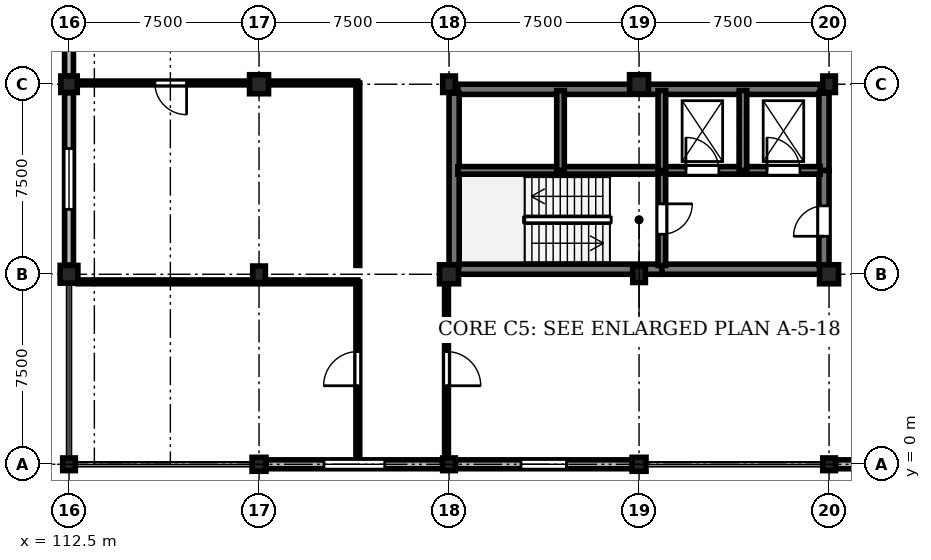
"""IFC4 building model, lengths in metres.
Left out: names, types, materials, properties, quantities, classifications, styles, units other than length and angle.
Written with IfcOpenShell. Run it as: python <this file> out.ifc"""

import sys

from ifc_helpers import new_model, si_unit, direction, frame, frame_2d, origin, origin_2d, place, context, subcontext, project, spatial, rectangle, extrude, element, fill, save


model = new_model("IFC4")
c1 = context("Model", 3, precision=1e-05, world=origin(), true_north=direction((0.0, 1.0)))
c2 = subcontext(c1, "Body", "Model", "MODEL_VIEW")
j1 = project(units=[si_unit("LENGTHUNIT", "METRE"), si_unit("PLANEANGLEUNIT", "RADIAN")], contexts=[c1])
p1 = place(None, origin())
s1 = spatial("IfcSite", under=j1, at=p1, CompositionType="ELEMENT")
p2 = place(p1, origin())
s2 = spatial("IfcBuilding", under=s1, at=p2, CompositionType="ELEMENT")
p3 = place(p2, frame((0.0, 0.0, 4.8)))
s3 = spatial("IfcBuildingStorey", under=s2, at=p3, CompositionType="ELEMENT", Elevation=4.8)
p4 = place(p3, frame((112.5, 0.0, 0.0), z_axis=(0.0, 0.0, 1.0), x_axis=(1.0, 0.0, 0.0)))
e1 = element("IfcColumn", 1, at=p4, inside=s3, PredefinedType="COLUMN", context=c2, shape_type="SweptSolid", body=[
    extrude(rectangle(XDim=0.5, YDim=0.5, at=origin_2d()), origin(), (0.0, 0.0, 1.0), 4.5),
])
p5 = place(p3, frame((112.5, 7.5, 0.0), z_axis=(0.0, 0.0, 1.0), x_axis=(1.0, 0.0, 0.0)))
e2 = element("IfcColumn", 2, at=p5, inside=s3, PredefinedType="COLUMN", context=c2, shape_type="SweptSolid", body=[
    extrude(rectangle(XDim=0.7, YDim=0.7, at=origin_2d()), origin(), (0.0, 0.0, 1.0), 4.5),
])
p6 = place(p3, frame((112.5, 15.0, 0.0), z_axis=(0.0, 0.0, 1.0), x_axis=(1.0, 0.0, 0.0)))
e3 = element("IfcColumn", 3, at=p6, inside=s3, PredefinedType="COLUMN", context=c2, shape_type="SweptSolid", body=[
    extrude(rectangle(XDim=0.65, YDim=0.65, at=origin_2d()), origin(), (0.0, 0.0, 1.0), 4.5),
])
p7 = place(p3, frame((120.0, 0.0, 0.0), z_axis=(0.0, 0.0, 1.0), x_axis=(1.0, 0.0, 0.0)))
e4 = element("IfcColumn", 4, at=p7, inside=s3, PredefinedType="COLUMN", context=c2, shape_type="SweptSolid", body=[
    extrude(rectangle(XDim=0.55, YDim=0.55, at=origin_2d()), origin(), (0.0, 0.0, 1.0), 4.5),
])
p8 = place(p3, frame((120.0, 7.5, 0.0), z_axis=(0.0, 0.0, 1.0), x_axis=(1.0, 0.0, 0.0)))
e5 = element("IfcColumn", 5, at=p8, inside=s3, PredefinedType="COLUMN", context=c2, shape_type="SweptSolid", body=[
    extrude(rectangle(XDim=0.5, YDim=0.65, at=origin_2d()), origin(), (0.0, 0.0, 1.0), 4.5),
])
p9 = place(p3, frame((120.0, 15.0, 0.0), z_axis=(0.0, 0.0, 1.0), x_axis=(1.0, 0.0, 0.0)))
e6 = element("IfcColumn", 6, at=p9, inside=s3, PredefinedType="COLUMN", context=c2, shape_type="SweptSolid", body=[
    extrude(rectangle(XDim=0.75, YDim=0.75, at=origin_2d()), origin(), (0.0, 0.0, 1.0), 4.5),
])
p10 = place(p3, frame((127.5, 0.0, 0.0), z_axis=(0.0, 0.0, 1.0), x_axis=(1.0, 0.0, 0.0)))
e7 = element("IfcColumn", 7, at=p10, inside=s3, PredefinedType="COLUMN", context=c2, shape_type="SweptSolid", body=[
    extrude(rectangle(XDim=0.5, YDim=0.5, at=origin_2d()), origin(), (0.0, 0.0, 1.0), 4.5),
])
p11 = place(p3, frame((127.5, 7.5, 0.0), z_axis=(0.0, 0.0, 1.0), x_axis=(1.0, 0.0, 0.0)))
e8 = element("IfcColumn", 8, at=p11, inside=s3, PredefinedType="COLUMN", context=c2, shape_type="SweptSolid", body=[
    extrude(rectangle(XDim=0.75, YDim=0.75, at=origin_2d()), origin(), (0.0, 0.0, 1.0), 4.5),
])
p12 = place(p3, frame((127.5, 15.0, 0.0), z_axis=(0.0, 0.0, 1.0), x_axis=(1.0, 0.0, 0.0)))
e9 = element("IfcColumn", 9, at=p12, inside=s3, PredefinedType="COLUMN", context=c2, shape_type="SweptSolid", body=[
    extrude(rectangle(XDim=0.5, YDim=0.65, at=origin_2d()), origin(), (0.0, 0.0, 1.0), 4.5),
])
p13 = place(p3, frame((135.0, 0.0, 0.0), z_axis=(0.0, 0.0, 1.0), x_axis=(1.0, 0.0, 0.0)))
e10 = element("IfcColumn", 10, at=p13, inside=s3, PredefinedType="COLUMN", context=c2, shape_type="SweptSolid", body=[
    extrude(rectangle(XDim=0.55, YDim=0.55, at=origin_2d()), origin(), (0.0, 0.0, 1.0), 4.5),
])
p14 = place(p3, frame((135.0, 7.5, 0.0), z_axis=(0.0, 0.0, 1.0), x_axis=(1.0, 0.0, 0.0)))
e11 = element("IfcColumn", 11, at=p14, inside=s3, PredefinedType="COLUMN", context=c2, shape_type="SweptSolid", body=[
    extrude(rectangle(XDim=0.5, YDim=0.65, at=origin_2d()), origin(), (0.0, 0.0, 1.0), 4.5),
])
p15 = place(p3, frame((135.0, 15.0, 0.0), z_axis=(0.0, 0.0, 1.0), x_axis=(1.0, 0.0, 0.0)))
e12 = element("IfcColumn", 12, at=p15, inside=s3, PredefinedType="COLUMN", context=c2, shape_type="SweptSolid", body=[
    extrude(rectangle(XDim=0.75, YDim=0.75, at=origin_2d()), origin(), (0.0, 0.0, 1.0), 4.5),
])
p16 = place(p3, frame((142.5, 0.0, 0.0), z_axis=(0.0, 0.0, 1.0), x_axis=(1.0, 0.0, 0.0)))
e13 = element("IfcColumn", 13, at=p16, inside=s3, PredefinedType="COLUMN", context=c2, shape_type="SweptSolid", body=[
    extrude(rectangle(XDim=0.5, YDim=0.5, at=origin_2d()), origin(), (0.0, 0.0, 1.0), 4.5),
])
p17 = place(p3, frame((142.5, 7.5, 0.0), z_axis=(0.0, 0.0, 1.0), x_axis=(1.0, 0.0, 0.0)))
e14 = element("IfcColumn", 14, at=p17, inside=s3, PredefinedType="COLUMN", context=c2, shape_type="SweptSolid", body=[
    extrude(rectangle(XDim=0.75, YDim=0.75, at=origin_2d()), origin(), (0.0, 0.0, 1.0), 4.5),
])
p18 = place(p3, frame((142.5, 15.0, 0.0), z_axis=(0.0, 0.0, 1.0), x_axis=(1.0, 0.0, 0.0)))
e15 = element("IfcColumn", 15, at=p18, inside=s3, PredefinedType="COLUMN", context=c2, shape_type="SweptSolid", body=[
    extrude(rectangle(XDim=0.5, YDim=0.65, at=origin_2d()), origin(), (0.0, 0.0, 1.0), 4.5),
])
p19 = place(p3, frame((112.5, 7.86, 0.0), z_axis=(0.0, 0.0, 1.0), x_axis=(0.0, 1.0, 0.0)))
e16 = element("IfcWall", 16, at=p19, inside=s3, PredefinedType="STANDARD", context=c2, shape_type="SweptSolid", body=[
    extrude(rectangle(XDim=6.805, YDim=0.35, at=frame_2d((3.402, 0.0))), origin(), (0.0, 0.0, 1.0), 3.63),
])
p20 = place(p19, frame((2.202, 0.0, 0.9)))
e17 = element("IfcOpeningElement", 17, at=p20, cuts=e16, PredefinedType="OPENING", context=c2, shape_type="SweptSolid", body=[
    extrude(rectangle(XDim=2.4, YDim=2.45, at=frame_2d((1.2, 1.225))), frame((0.0, 0.185, 0.0), z_axis=(0.0, -1.0, 0.0), x_axis=(1.0, 0.0, 0.0)), (0.0, 0.0, 1.0), 0.37),
])
p21 = place(p3, frame((112.5, 15.335, 0.0), z_axis=(0.0, 0.0, 1.0), x_axis=(0.0, 1.0, 0.0)))
e18 = element("IfcWall", 18, at=p21, inside=s3, PredefinedType="STANDARD", context=c2, shape_type="SweptSolid", body=[
    extrude(rectangle(XDim=6.995, YDim=0.35, at=frame_2d((3.498, 0.0))), origin(), (0.0, 0.0, 1.0), 3.63),
])
p22 = place(p21, frame((2.597, 0.0, 0.9)))
e19 = element("IfcOpeningElement", 19, at=p22, cuts=e18, PredefinedType="OPENING", context=c2, shape_type="SweptSolid", body=[
    extrude(rectangle(XDim=1.8, YDim=2.1, at=frame_2d((0.9, 1.05))), frame((0.0, 0.185, 0.0), z_axis=(0.0, -1.0, 0.0), x_axis=(1.0, 0.0, 0.0)), (0.0, 0.0, 1.0), 0.37),
])
p23 = place(p3, frame((127.24, 0.0, 0.0), z_axis=(0.0, 0.0, 1.0), x_axis=(-1.0, 0.0, 0.0)))
e20 = element("IfcWall", 20, at=p23, inside=s3, PredefinedType="STANDARD", context=c2, shape_type="SweptSolid", body=[
    extrude(rectangle(XDim=6.955, YDim=0.35, at=frame_2d((3.478, 0.0))), origin(), (0.0, 0.0, 1.0), 3.63),
])
p24 = place(p23, frame((2.278, 0.0, 0.9)))
e21 = element("IfcOpeningElement", 21, at=p24, cuts=e20, PredefinedType="OPENING", context=c2, shape_type="SweptSolid", body=[
    extrude(rectangle(XDim=2.4, YDim=2.45, at=frame_2d((1.2, 1.225))), frame((0.0, 0.185, 0.0), z_axis=(0.0, -1.0, 0.0), x_axis=(1.0, 0.0, 0.0)), (0.0, 0.0, 1.0), 0.37),
])
p25 = place(p3, frame((134.715, 0.0, 0.0), z_axis=(0.0, 0.0, 1.0), x_axis=(-1.0, 0.0, 0.0)))
e22 = element("IfcWall", 22, at=p25, inside=s3, PredefinedType="STANDARD", context=c2, shape_type="SweptSolid", body=[
    extrude(rectangle(XDim=6.955, YDim=0.35, at=frame_2d((3.478, 0.0))), origin(), (0.0, 0.0, 1.0), 3.63),
])
p26 = place(p25, frame((2.577, 0.0, 0.9)))
e23 = element("IfcOpeningElement", 23, at=p26, cuts=e22, PredefinedType="OPENING", context=c2, shape_type="SweptSolid", body=[
    extrude(rectangle(XDim=1.8, YDim=2.1, at=frame_2d((0.9, 1.05))), frame((0.0, 0.185, 0.0), z_axis=(0.0, -1.0, 0.0), x_axis=(1.0, 0.0, 0.0)), (0.0, 0.0, 1.0), 0.37),
])
p27 = place(p3, frame((149.715, 0.0, 0.0), z_axis=(0.0, 0.0, 1.0), x_axis=(-1.0, 0.0, 0.0)))
e24 = element("IfcWall", 24, at=p27, inside=s3, PredefinedType="STANDARD", context=c2, shape_type="SweptSolid", body=[
    extrude(rectangle(XDim=6.955, YDim=0.35, at=frame_2d((3.478, 0.0))), origin(), (0.0, 0.0, 1.0), 3.63),
])
p28 = place(p27, frame((2.877, 0.0, 0.9)))
e25 = element("IfcOpeningElement", 25, at=p28, cuts=e24, PredefinedType="OPENING", context=c2, shape_type="SweptSolid", body=[
    extrude(rectangle(XDim=1.2, YDim=2.1, at=frame_2d((0.6, 1.05))), frame((0.0, 0.185, 0.0), z_axis=(0.0, -1.0, 0.0), x_axis=(1.0, 0.0, 0.0)), (0.0, 0.0, 1.0), 0.37),
])
p29 = place(p3, frame((127.85, 7.7, 0.0), z_axis=(0.0, 0.0, 1.0), x_axis=(1.0, 0.0, 0.0)))
e26 = element("IfcWall", 26, at=p29, inside=s3, PredefinedType="SHEAR", context=c2, shape_type="SweptSolid", body=[
    extrude(rectangle(XDim=8.05, YDim=0.4, at=frame_2d((4.025, 0.0))), origin(), (0.0, 0.0, 1.0), 4.18),
])
p30 = place(p3, frame((135.9, 7.7, 0.0), z_axis=(0.0, 0.0, 1.0), x_axis=(1.0, 0.0, 0.0)))
e27 = element("IfcWall", 27, at=p30, inside=s3, PredefinedType="SHEAR", context=c2, shape_type="SweptSolid", body=[
    extrude(rectangle(XDim=6.25, YDim=0.4, at=frame_2d((3.125, 0.0))), origin(), (0.0, 0.0, 1.0), 4.18),
])
p31 = place(p3, frame((127.85, 14.8, 0.0), z_axis=(0.0, 0.0, 1.0), x_axis=(1.0, 0.0, 0.0)))
e28 = element("IfcWall", 28, at=p31, inside=s3, PredefinedType="SHEAR", context=c2, shape_type="SweptSolid", body=[
    extrude(rectangle(XDim=14.3, YDim=0.4, at=frame_2d((7.15, 0.0))), origin(), (0.0, 0.0, 1.0), 4.18),
])
p32 = place(p3, frame((127.7, 7.85, 0.0), z_axis=(0.0, 0.0, 1.0), x_axis=(0.0, 1.0, 0.0)))
e29 = element("IfcWall", 29, at=p32, inside=s3, PredefinedType="SHEAR", context=c2, shape_type="SweptSolid", body=[
    extrude(rectangle(XDim=6.8, YDim=0.4, at=frame_2d((3.4, 0.0))), origin(), (0.0, 0.0, 1.0), 4.18),
])
p33 = place(p3, frame((142.3, 7.85, 0.0), z_axis=(0.0, 0.0, 1.0), x_axis=(0.0, 1.0, 0.0)))
e30 = element("IfcWall", 30, at=p33, inside=s3, PredefinedType="SHEAR", context=c2, shape_type="SweptSolid", body=[
    extrude(rectangle(XDim=3.75, YDim=0.4, at=frame_2d((1.875, 0.0))), origin(), (0.0, 0.0, 1.0), 4.18),
])
p34 = place(p33, frame((1.15, 0.0, 0.0)))
e31 = element("IfcOpeningElement", 31, at=p34, cuts=e30, PredefinedType="OPENING", context=c2, shape_type="SweptSolid", body=[
    extrude(rectangle(XDim=1.2, YDim=2.25, at=frame_2d((0.6, 1.125))), frame((0.0, 0.21, 0.0), z_axis=(0.0, -1.0, 0.0), x_axis=(1.0, 0.0, 0.0)), (0.0, 0.0, 1.0), 0.42),
])
p35 = place(p3, frame((142.3, 11.6, 0.0), z_axis=(0.0, 0.0, 1.0), x_axis=(0.0, 1.0, 0.0)))
e32 = element("IfcWall", 32, at=p35, inside=s3, PredefinedType="SHEAR", context=c2, shape_type="SweptSolid", body=[
    extrude(rectangle(XDim=3.05, YDim=0.4, at=frame_2d((1.525, 0.0))), origin(), (0.0, 0.0, 1.0), 4.18),
])
p36 = place(p3, frame((127.85, 11.6, 0.0), z_axis=(0.0, 0.0, 1.0), x_axis=(1.0, 0.0, 0.0)))
e33 = element("IfcWall", 33, at=p36, inside=s3, PredefinedType="SHEAR", context=c2, shape_type="SweptSolid", body=[
    extrude(rectangle(XDim=8.05, YDim=0.3, at=frame_2d((4.025, 0.0))), origin(), (0.0, 0.0, 1.0), 4.18),
])
p37 = place(p3, frame((135.9, 11.6, 0.0), z_axis=(0.0, 0.0, 1.0), x_axis=(1.0, 0.0, 0.0)))
e34 = element("IfcWall", 34, at=p37, inside=s3, PredefinedType="SHEAR", context=c2, shape_type="SweptSolid", body=[
    extrude(rectangle(XDim=6.25, YDim=0.3, at=frame_2d((3.125, 0.0))), origin(), (0.0, 0.0, 1.0), 4.18),
])
p38 = place(p37, frame((0.95, 0.0, 0.0)))
e35 = element("IfcOpeningElement", 35, at=p38, cuts=e34, PredefinedType="OPENING", context=c2, shape_type="SweptSolid", body=[
    extrude(rectangle(XDim=1.3, YDim=2.2, at=frame_2d((0.65, 1.1))), frame((0.0, 0.16, 0.0), z_axis=(0.0, -1.0, 0.0), x_axis=(1.0, 0.0, 0.0)), (0.0, 0.0, 1.0), 0.32),
])
p39 = place(p37, frame((4.15, 0.0, 0.0)))
e36 = element("IfcOpeningElement", 36, at=p39, cuts=e34, PredefinedType="OPENING", context=c2, shape_type="SweptSolid", body=[
    extrude(rectangle(XDim=1.3, YDim=2.2, at=frame_2d((0.65, 1.1))), frame((0.0, 0.16, 0.0), z_axis=(0.0, -1.0, 0.0), x_axis=(1.0, 0.0, 0.0)), (0.0, 0.0, 1.0), 0.32),
])
p40 = place(p3, frame((135.9, 11.5, 0.0), z_axis=(0.0, 0.0, 1.0), x_axis=(0.0, -1.0, 0.0)))
e37 = element("IfcWall", 37, at=p40, inside=s3, PredefinedType="SHEAR", context=c2, shape_type="SweptSolid", body=[
    extrude(rectangle(XDim=3.65, YDim=0.3, at=frame_2d((1.825, 0.0))), origin(), (0.0, 0.0, 1.0), 4.18),
])
p41 = place(p40, frame((1.22, 0.0, 0.0)))
e38 = element("IfcOpeningElement", 38, at=p41, cuts=e37, PredefinedType="OPENING", context=c2, shape_type="SweptSolid", body=[
    extrude(rectangle(XDim=1.2, YDim=2.25, at=frame_2d((0.6, 1.125))), frame((0.0, 0.16, 0.0), z_axis=(0.0, -1.0, 0.0), x_axis=(1.0, 0.0, 0.0)), (0.0, 0.0, 1.0), 0.32),
])
for number, where, z_axis, x_axis in (
    (39, (131.9, 11.6, 0.0), (0.0, 0.0, 1.0), (0.0, 1.0, 0.0)),
    (40, (135.9, 11.6, 0.0), (0.0, 0.0, 1.0), (0.0, 1.0, 0.0)),
    (41, (139.1, 11.6, 0.0), (0.0, 0.0, 1.0), (0.0, 1.0, 0.0)),
):
    element("IfcWall", number, at=place(p3, frame(where, z_axis=z_axis, x_axis=x_axis)), inside=s3, PredefinedType="SHEAR", context=c2, shape_type="SweptSolid", body=[
        extrude(rectangle(XDim=3.15, YDim=0.3, at=frame_2d((1.575, 0.0))), origin(), (0.0, 0.0, 1.0), 4.18),
    ])
p42 = place(p3, frame((123.9, 0.35, 0.0), z_axis=(0.0, 0.0, 1.0), x_axis=(0.0, 1.0, 0.0)))
e42 = element("IfcWall", 42, at=p42, inside=s3, PredefinedType="PARTITIONING", context=c2, shape_type="SweptSolid", body=[
    extrude(rectangle(XDim=6.85, YDim=0.15, at=frame_2d((3.425, 0.0))), origin(), (0.0, 0.0, 1.0), 3.765),
])
p43 = place(p42, frame((2.75, 0.0, 0.0)))
e43 = element("IfcOpeningElement", 43, at=p43, cuts=e42, PredefinedType="OPENING", context=c2, shape_type="SweptSolid", body=[
    extrude(rectangle(XDim=1.35, YDim=2.25, at=frame_2d((0.675, 1.125))), frame((0.0, 0.085, 0.0), z_axis=(0.0, -1.0, 0.0), x_axis=(1.0, 0.0, 0.0)), (0.0, 0.0, 1.0), 0.17),
])
p44 = place(p3, frame((127.4, 7.2, 0.0), z_axis=(0.0, 0.0, 1.0), x_axis=(0.0, -1.0, 0.0)))
e44 = element("IfcWall", 44, at=p44, inside=s3, PredefinedType="PARTITIONING", context=c2, shape_type="SweptSolid", body=[
    extrude(rectangle(XDim=6.85, YDim=0.15, at=frame_2d((3.425, 0.0))), origin(), (0.0, 0.0, 1.0), 3.565),
])
p45 = place(p44, frame((2.75, 0.0, 0.0)))
e45 = element("IfcOpeningElement", 45, at=p45, cuts=e44, PredefinedType="OPENING", context=c2, shape_type="SweptSolid", body=[
    extrude(rectangle(XDim=1.35, YDim=2.25, at=frame_2d((0.675, 1.125))), frame((0.0, 0.085, 0.0), z_axis=(0.0, -1.0, 0.0), x_axis=(1.0, 0.0, 0.0)), (0.0, 0.0, 1.0), 0.17),
])
p46 = place(p3, frame((123.9, 15.05, 0.0), z_axis=(0.0, 0.0, 1.0), x_axis=(-1.0, 0.0, 0.0)))
e46 = element("IfcWall", 46, at=p46, inside=s3, PredefinedType="PARTITIONING", context=c2, shape_type="SweptSolid", body=[
    extrude(rectangle(XDim=11.05, YDim=0.15, at=frame_2d((5.525, 0.0))), origin(), (0.0, 0.0, 1.0), 3.515),
])
p47 = place(p46, frame((6.76, 0.0, 0.0)))
e47 = element("IfcOpeningElement", 47, at=p47, cuts=e46, PredefinedType="OPENING", context=c2, shape_type="SweptSolid", body=[
    extrude(rectangle(XDim=1.25, YDim=2.2, at=frame_2d((0.625, 1.1))), frame((0.0, 0.085, 0.0), z_axis=(0.0, -1.0, 0.0), x_axis=(1.0, 0.0, 0.0)), (0.0, 0.0, 1.0), 0.17),
])
p48 = place(p3, frame((112.85, 7.2, 0.0), z_axis=(0.0, 0.0, 1.0), x_axis=(1.0, 0.0, 0.0)))
e48 = element("IfcWall", 48, at=p48, inside=s3, PredefinedType="PARTITIONING", context=c2, shape_type="SweptSolid", body=[
    extrude(rectangle(XDim=11.05, YDim=0.15, at=frame_2d((5.525, 0.0))), origin(), (0.0, 0.0, 1.0), 3.515),
])
p49 = place(p3, frame((123.9, 7.85, 0.0), z_axis=(0.0, 0.0, 1.0), x_axis=(0.0, 1.0, 0.0)))
e49 = element("IfcWall", 49, at=p49, inside=s3, PredefinedType="PARTITIONING", context=c2, shape_type="SweptSolid", body=[
    extrude(rectangle(XDim=7.2, YDim=0.15, at=frame_2d((3.6, 0.0))), origin(), (0.0, 0.0, 1.0), 4.165),
])
p50 = place(p20, origin())
e50 = element("IfcWindow", 50, at=p50, inside=s3, PartitioningType="SINGLE_PANEL", PredefinedType="WINDOW", context=c2, shape_type="SweptSolid", body=[
    extrude(rectangle(XDim=2.4, YDim=2.45, at=frame_2d((1.2, 1.225))), frame((0.0, 0.03, 0.0), z_axis=(0.0, -1.0, 0.0), x_axis=(1.0, 0.0, 0.0)), (0.0, 0.0, 1.0), 0.06),
])
fill(e17, e50)
p51 = place(p24, origin())
e51 = element("IfcWindow", 51, at=p51, inside=s3, PartitioningType="SINGLE_PANEL", PredefinedType="WINDOW", context=c2, shape_type="SweptSolid", body=[
    extrude(rectangle(XDim=2.4, YDim=2.45, at=frame_2d((1.2, 1.225))), frame((0.0, 0.03, 0.0), z_axis=(0.0, -1.0, 0.0), x_axis=(1.0, 0.0, 0.0)), (0.0, 0.0, 1.0), 0.06),
])
fill(e21, e51)
p52 = place(p26, origin())
e52 = element("IfcWindow", 52, at=p52, inside=s3, PartitioningType="SINGLE_PANEL", PredefinedType="WINDOW", context=c2, shape_type="SweptSolid", body=[
    extrude(rectangle(XDim=1.8, YDim=2.1, at=frame_2d((0.9, 1.05))), frame((0.0, 0.03, 0.0), z_axis=(0.0, -1.0, 0.0), x_axis=(1.0, 0.0, 0.0)), (0.0, 0.0, 1.0), 0.06),
])
fill(e23, e52)
p53 = place(p34, origin())
e53 = element("IfcDoor", 53, at=p53, inside=s3, OperationType="SINGLE_SWING_LEFT", PredefinedType="DOOR", context=c2, shape_type="SweptSolid", body=[
    extrude(rectangle(XDim=1.2, YDim=2.25, at=frame_2d((0.6, 1.125))), frame((0.0, 0.025, 0.0), z_axis=(0.0, -1.0, 0.0), x_axis=(1.0, 0.0, 0.0)), (0.0, 0.0, 1.0), 0.05),
])
fill(e31, e53)
p54 = place(p38, origin())
e54 = element("IfcDoor", 54, at=p54, inside=s3, OperationType="DOUBLE_DOOR_SLIDING", PredefinedType="DOOR", context=c2, shape_type="SweptSolid", body=[
    extrude(rectangle(XDim=1.3, YDim=2.2, at=frame_2d((0.65, 1.1))), frame((0.0, 0.025, 0.0), z_axis=(0.0, -1.0, 0.0), x_axis=(1.0, 0.0, 0.0)), (0.0, 0.0, 1.0), 0.05),
])
fill(e35, e54)
p55 = place(p39, origin())
e55 = element("IfcDoor", 55, at=p55, inside=s3, OperationType="DOUBLE_DOOR_SLIDING", PredefinedType="DOOR", context=c2, shape_type="SweptSolid", body=[
    extrude(rectangle(XDim=1.3, YDim=2.2, at=frame_2d((0.65, 1.1))), frame((0.0, 0.025, 0.0), z_axis=(0.0, -1.0, 0.0), x_axis=(1.0, 0.0, 0.0)), (0.0, 0.0, 1.0), 0.05),
])
fill(e36, e55)
p56 = place(p41, origin())
e56 = element("IfcDoor", 56, at=p56, inside=s3, OperationType="SINGLE_SWING_LEFT", PredefinedType="DOOR", context=c2, shape_type="SweptSolid", body=[
    extrude(rectangle(XDim=1.2, YDim=2.25, at=frame_2d((0.6, 1.125))), frame((0.0, 0.025, 0.0), z_axis=(0.0, -1.0, 0.0), x_axis=(1.0, 0.0, 0.0)), (0.0, 0.0, 1.0), 0.05),
])
fill(e38, e56)
p57 = place(p43, origin())
e57 = element("IfcDoor", 57, at=p57, inside=s3, OperationType="SINGLE_SWING_LEFT", PredefinedType="DOOR", context=c2, shape_type="SweptSolid", body=[
    extrude(rectangle(XDim=1.35, YDim=2.25, at=frame_2d((0.675, 1.125))), frame((0.0, 0.025, 0.0), z_axis=(0.0, -1.0, 0.0), x_axis=(1.0, 0.0, 0.0)), (0.0, 0.0, 1.0), 0.05),
])
fill(e43, e57)
p58 = place(p45, origin())
e58 = element("IfcDoor", 58, at=p58, inside=s3, OperationType="SINGLE_SWING_RIGHT", PredefinedType="DOOR", context=c2, shape_type="SweptSolid", body=[
    extrude(rectangle(XDim=1.35, YDim=2.25, at=frame_2d((0.675, 1.125))), frame((0.0, 0.025, 0.0), z_axis=(0.0, -1.0, 0.0), x_axis=(1.0, 0.0, 0.0)), (0.0, 0.0, 1.0), 0.05),
])
fill(e45, e58)
p59 = place(p47, origin())
e59 = element("IfcDoor", 59, at=p59, inside=s3, OperationType="SINGLE_SWING_LEFT", PredefinedType="DOOR", context=c2, shape_type="SweptSolid", body=[
    extrude(rectangle(XDim=1.25, YDim=2.2, at=frame_2d((0.625, 1.1))), frame((0.0, 0.025, 0.0), z_axis=(0.0, -1.0, 0.0), x_axis=(1.0, 0.0, 0.0)), (0.0, 0.0, 1.0), 0.05),
])
fill(e47, e59)
save(model, sys.argv[1])
